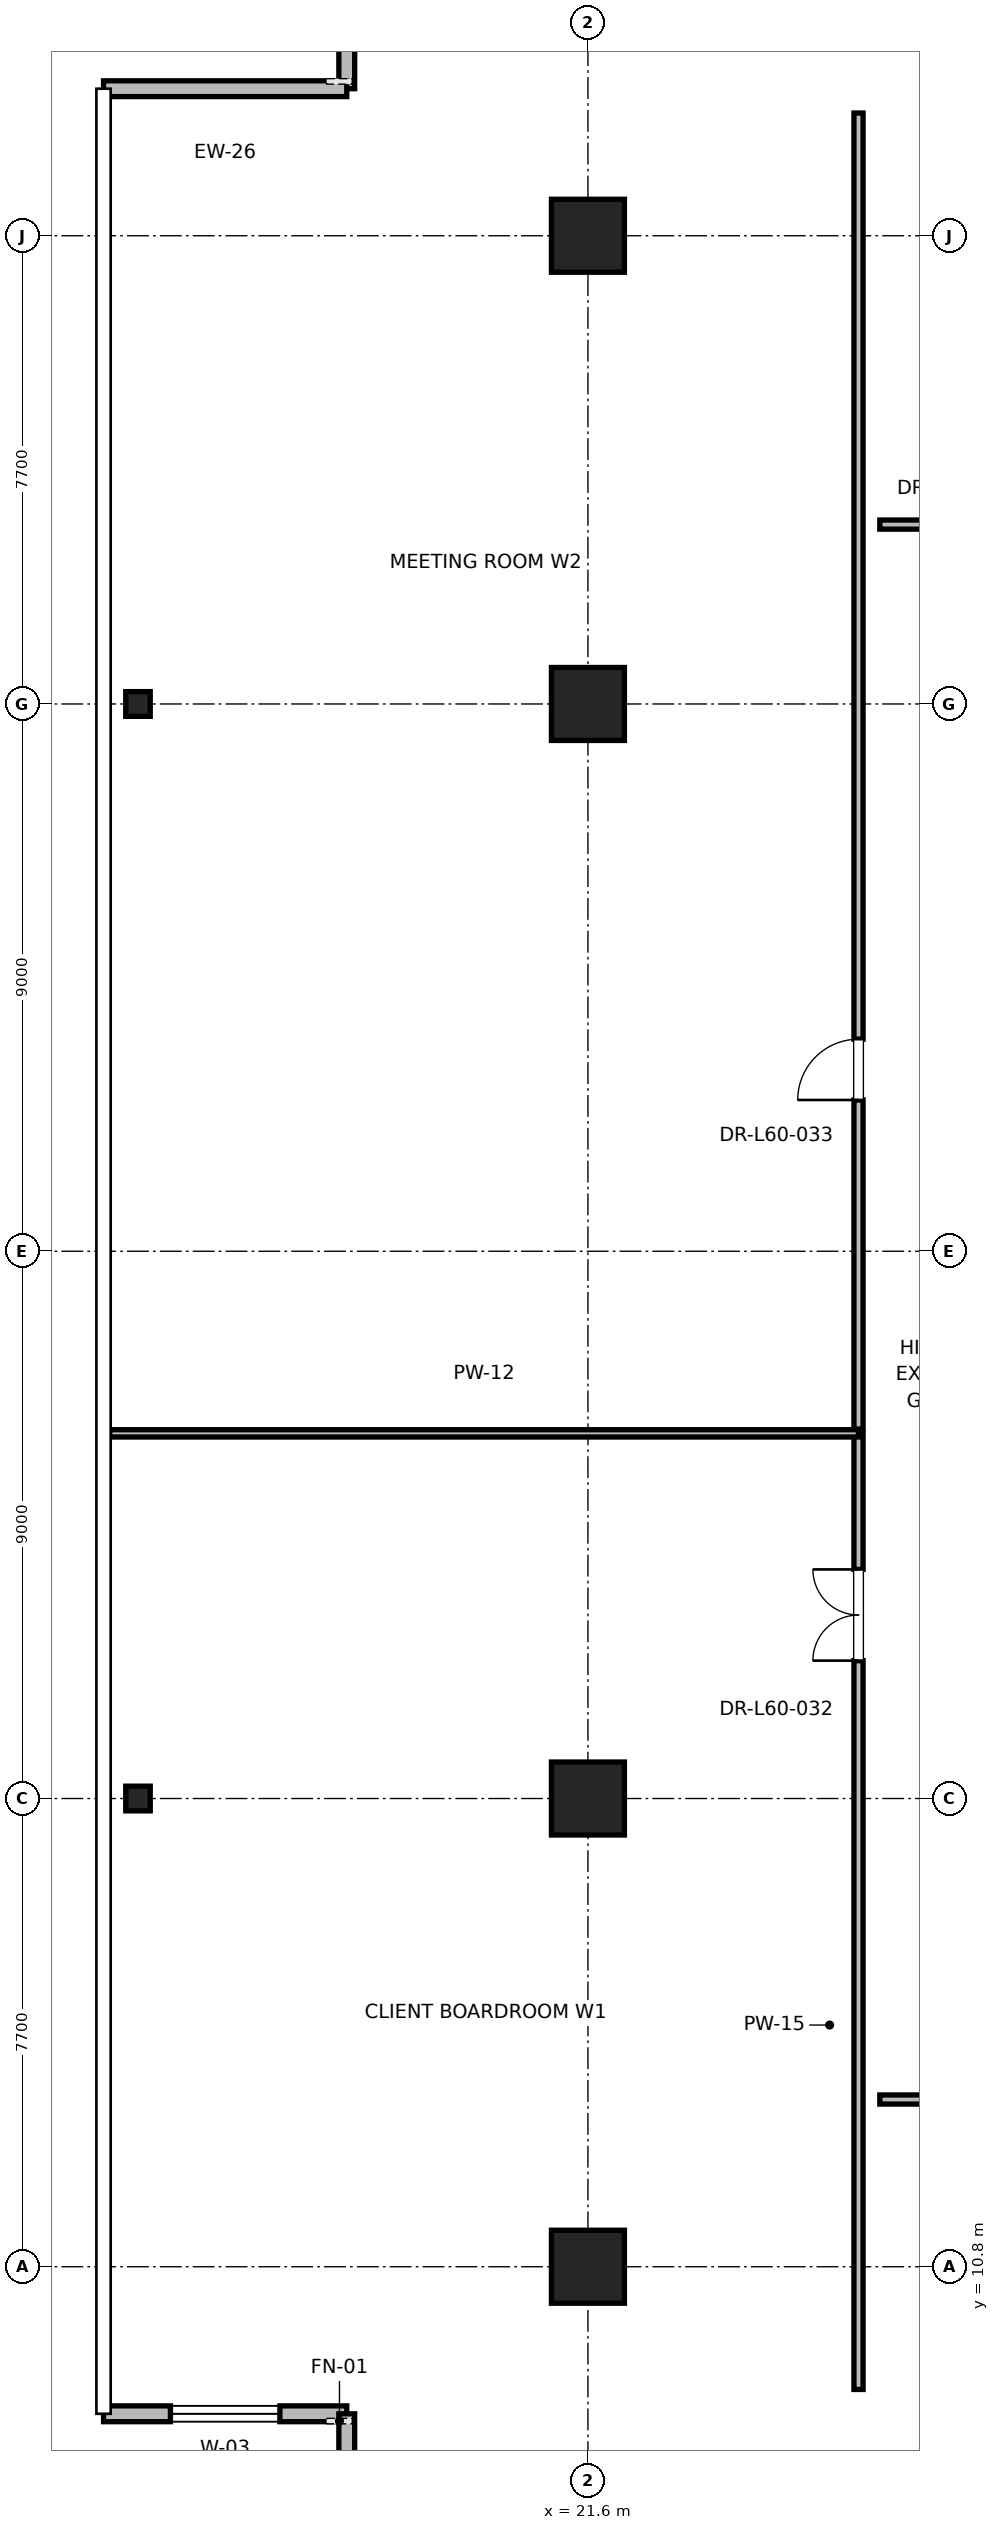
"""IFC4 building model, lengths in metres.
Left out: names, types, materials, properties, quantities, classifications, styles, units other than length and angle.
Written with IfcOpenShell. Run it as: python <this file> out.ifc"""

import sys

from ifc_helpers import new_model, si_unit, direction, frame, frame_2d, origin, origin_2d, place, context, subcontext, project, spatial, rectangle, i_section, extrude, element, fill, save


model = new_model("IFC4")
c1 = context("Model", 3, precision=1e-05, world=origin(), true_north=direction((0.0, 1.0)))
c2 = subcontext(c1, "Body", "Model", "MODEL_VIEW")
j1 = project(units=[si_unit("LENGTHUNIT", "METRE"), si_unit("PLANEANGLEUNIT", "RADIAN")], contexts=[c1])
p1 = place(None, origin())
s1 = spatial("IfcSite", under=j1, at=p1, CompositionType="ELEMENT")
p2 = place(p1, origin())
s2 = spatial("IfcBuilding", under=s1, at=p2, CompositionType="ELEMENT")
p3 = place(p2, frame((0.0, 0.0, 259.2)))
s3 = spatial("IfcBuildingStorey", under=s2, at=p3, CompositionType="ELEMENT", Elevation=259.2)
for number, where, z_axis, x_axis in (
    (1, (21.6, 18.5, 0.0), (0.0, 0.0, 1.0), (1.0, 0.0, 0.0)),
    (2, (21.6, 36.5, 0.0), (0.0, 0.0, 1.0), (1.0, 0.0, 0.0)),
    (3, (21.6, 10.8, 0.0), (0.0, 0.0, 1.0), (1.0, 0.0, 0.0)),
    (4, (21.6, 44.2, 0.0), (0.0, 0.0, 1.0), (1.0, 0.0, 0.0)),
):
    element("IfcColumn", number, at=place(p3, frame(where, z_axis=z_axis, x_axis=x_axis)), inside=s3, PredefinedType="COLUMN", context=c2, shape_type="SweptSolid", body=[
        extrude(rectangle(XDim=1.2, YDim=1.2, at=origin_2d()), origin(), (0.0, 0.0, 1.0), 4.0),
    ])
for number, where, z_axis, x_axis in (
    (5, (14.2, 18.5, 0.0), (0.0, 0.0, 1.0), (1.0, 0.0, 0.0)),
    (6, (14.2, 36.5, 0.0), (0.0, 0.0, 1.0), (1.0, 0.0, 0.0)),
):
    element("IfcColumn", number, at=place(p3, frame(where, z_axis=z_axis, x_axis=x_axis)), inside=s3, PredefinedType="COLUMN", context=c2, shape_type="SweptSolid", body=[
        extrude(i_section(OverallWidth=0.403, OverallDepth=0.406, WebThickness=0.027, FlangeThickness=0.043, FilletRadius=0.015, at=origin_2d()), origin(), (0.0, 0.0, 1.0), 4.0),
    ])
p4 = place(p3, frame((13.634, 8.382, 0.0), z_axis=(0.0, 0.0, 1.0), x_axis=(1.0, 0.0, 0.0)))
e7 = element("IfcWall", 7, at=p4, inside=s3, PredefinedType="PARAPET", context=c2, shape_type="SweptSolid", body=[
    extrude(rectangle(XDim=4.0, YDim=0.26, at=frame_2d((2.0, 0.0))), origin(), (0.0, 0.0, 1.0), 3.785),
])
p5 = place(p4, frame((1.1, 0.0, 0.85)))
e8 = element("IfcOpeningElement", 8, at=p5, cuts=e7, PredefinedType="OPENING", context=c2, shape_type="SweptSolid", body=[
    extrude(rectangle(XDim=1.8, YDim=2.2, at=frame_2d((0.9, 1.1))), frame((0.0, 0.13, 0.0), z_axis=(0.0, -1.0, 0.0), x_axis=(1.0, 0.0, 0.0)), (0.0, 0.0, 1.0), 0.26),
])
p6 = place(p3, frame((17.634, 8.382, 0.0), z_axis=(0.0, 0.0, 1.0), x_axis=(0.0, -1.0, 0.0)))
e9 = element("IfcWall", 9, at=p6, inside=s3, PredefinedType="PARAPET", context=c2, shape_type="SweptSolid", body=[
    extrude(rectangle(XDim=3.5, YDim=0.26, at=frame_2d((1.75, 0.0))), origin(), (0.0, 0.0, 1.0), 3.785),
])
p7 = place(p3, frame((17.634, 50.118, 0.0), z_axis=(0.0, 0.0, 1.0), x_axis=(0.0, -1.0, 0.0)))
e10 = element("IfcWall", 10, at=p7, inside=s3, PredefinedType="PARAPET", context=c2, shape_type="SweptSolid", body=[
    extrude(rectangle(XDim=3.5, YDim=0.26, at=frame_2d((1.75, 0.0))), origin(), (0.0, 0.0, 1.0), 3.785),
])
p8 = place(p7, frame((0.85, 0.0, 0.85)))
e11 = element("IfcOpeningElement", 11, at=p8, cuts=e10, PredefinedType="OPENING", context=c2, shape_type="SweptSolid", body=[
    extrude(rectangle(XDim=1.8, YDim=2.2, at=frame_2d((0.9, 1.1))), frame((0.0, 0.13, 0.0), z_axis=(0.0, -1.0, 0.0), x_axis=(1.0, 0.0, 0.0)), (0.0, 0.0, 1.0), 0.26),
])
p9 = place(p3, frame((17.634, 46.618, 0.0), z_axis=(0.0, 0.0, 1.0), x_axis=(-1.0, 0.0, 0.0)))
e12 = element("IfcWall", 12, at=p9, inside=s3, PredefinedType="PARAPET", context=c2, shape_type="SweptSolid", body=[
    extrude(rectangle(XDim=4.0, YDim=0.26, at=frame_2d((2.0, 0.0))), origin(), (0.0, 0.0, 1.0), 3.785),
])
p10 = place(p3, frame((26.4, 39.45, 0.0), z_axis=(0.0, 0.0, 1.0), x_axis=(1.0, 0.0, 0.0)))
e13 = element("IfcWall", 13, at=p10, inside=s3, PredefinedType="PARTITIONING", context=c2, shape_type="SweptSolid", body=[
    extrude(rectangle(XDim=6.528, YDim=0.15, at=frame_2d((3.264, 0.0))), origin(), (0.0, 0.0, 1.0), 2.85),
])
p11 = place(p10, frame((2.779, 0.0, 0.0)))
e14 = element("IfcOpeningElement", 14, at=p11, cuts=e13, PredefinedType="OPENING", context=c2, shape_type="SweptSolid", body=[
    extrude(rectangle(XDim=1.0, YDim=2.15, at=frame_2d((0.5, 1.075))), frame((0.0, 0.075, 0.0), z_axis=(0.0, -1.0, 0.0), x_axis=(1.0, 0.0, 0.0)), (0.0, 0.0, 1.0), 0.15),
])
p12 = place(p3, frame((26.4, 13.55, 0.0), z_axis=(0.0, 0.0, 1.0), x_axis=(1.0, 0.0, 0.0)))
e15 = element("IfcWall", 15, at=p12, inside=s3, PredefinedType="PARTITIONING", context=c2, shape_type="SweptSolid", body=[
    extrude(rectangle(XDim=27.2, YDim=0.15, at=frame_2d((13.6, 0.0))), origin(), (0.0, 0.0, 1.0), 2.85),
])
p13 = place(p12, frame((13.075, 0.0, 0.0)))
e16 = element("IfcOpeningElement", 16, at=p13, cuts=e15, PredefinedType="OPENING", context=c2, shape_type="SweptSolid", body=[
    extrude(rectangle(XDim=1.05, YDim=2.2, at=frame_2d((0.525, 1.1))), frame((0.0, 0.075, 0.0), z_axis=(0.0, -1.0, 0.0), x_axis=(1.0, 0.0, 0.0)), (0.0, 0.0, 1.0), 0.15),
])
p14 = place(p3, frame((26.05, 8.782, 0.0), z_axis=(0.0, 0.0, 1.0), x_axis=(0.0, 1.0, 0.0)))
e17 = element("IfcWall", 17, at=p14, inside=s3, PredefinedType="PARTITIONING", context=c2, shape_type="SweptSolid", body=[
    extrude(rectangle(XDim=15.723, YDim=0.15, at=frame_2d((7.862, 0.0))), origin(), (0.0, 0.0, 1.0), 2.85),
])
p15 = place(p14, frame((11.986, 0.0, 0.0)))
e18 = element("IfcOpeningElement", 18, at=p15, cuts=e17, PredefinedType="OPENING", context=c2, shape_type="SweptSolid", body=[
    extrude(rectangle(XDim=1.5, YDim=2.25, at=frame_2d((0.75, 1.125))), frame((0.0, 0.075, 0.0), z_axis=(0.0, -1.0, 0.0), x_axis=(1.0, 0.0, 0.0)), (0.0, 0.0, 1.0), 0.15),
])
p16 = place(p3, frame((13.733, 24.505, 0.0), z_axis=(0.0, 0.0, 1.0), x_axis=(1.0, 0.0, 0.0)))
e19 = element("IfcWall", 19, at=p16, inside=s3, PredefinedType="PARTITIONING", context=c2, shape_type="SweptSolid", body=[
    extrude(rectangle(XDim=12.317, YDim=0.12, at=frame_2d((6.158, 0.0))), origin(), (0.0, 0.0, 1.0), 2.85),
])
p17 = place(p3, frame((26.05, 24.575, 0.0), z_axis=(0.0, 0.0, 1.0), x_axis=(0.0, 1.0, 0.0)))
e20 = element("IfcWall", 20, at=p17, inside=s3, PredefinedType="PARTITIONING", context=c2, shape_type="SweptSolid", body=[
    extrude(rectangle(XDim=21.643, YDim=0.15, at=frame_2d((10.822, 0.0))), origin(), (0.0, 0.0, 1.0), 2.85),
])
p18 = place(p17, frame((5.412, 0.0, 0.0)))
e21 = element("IfcOpeningElement", 21, at=p18, cuts=e20, PredefinedType="OPENING", context=c2, shape_type="SweptSolid", body=[
    extrude(rectangle(XDim=1.0, YDim=2.15, at=frame_2d((0.5, 1.075))), frame((0.0, 0.075, 0.0), z_axis=(0.0, -1.0, 0.0), x_axis=(1.0, 0.0, 0.0)), (0.0, 0.0, 1.0), 0.15),
])
p19 = place(p5, origin())
e22 = element("IfcWindow", 22, at=p19, inside=s3, PartitioningType="SINGLE_PANEL", PredefinedType="WINDOW", context=c2, shape_type="SweptSolid", body=[
    extrude(rectangle(XDim=1.8, YDim=2.2, at=frame_2d((0.9, 1.1))), frame((0.0, 0.03, 0.0), z_axis=(0.0, -1.0, 0.0), x_axis=(1.0, 0.0, 0.0)), (0.0, 0.0, 1.0), 0.06),
])
fill(e8, e22)
p20 = place(p15, origin())
e23 = element("IfcDoor", 23, at=p20, inside=s3, OperationType="DOUBLE_DOOR_SINGLE_SWING", PredefinedType="DOOR", context=c2, shape_type="SweptSolid", body=[
    extrude(rectangle(XDim=1.5, YDim=2.25, at=frame_2d((0.75, 1.125))), frame((0.0, 0.025, 0.0), z_axis=(0.0, -1.0, 0.0), x_axis=(1.0, 0.0, 0.0)), (0.0, 0.0, 1.0), 0.05),
])
fill(e18, e23)
p21 = place(p18, origin())
e24 = element("IfcDoor", 24, at=p21, inside=s3, OperationType="SINGLE_SWING_LEFT", PredefinedType="DOOR", context=c2, shape_type="SweptSolid", body=[
    extrude(rectangle(XDim=1.0, YDim=2.15, at=frame_2d((0.5, 1.075))), frame((0.0, 0.025, 0.0), z_axis=(0.0, -1.0, 0.0), x_axis=(1.0, 0.0, 0.0)), (0.0, 0.0, 1.0), 0.05),
])
fill(e21, e24)
save(model, sys.argv[1])
